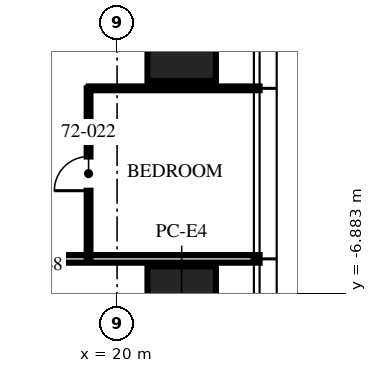
"""IFC4 building model, lengths in metres.
Left out: names, types, materials, properties, quantities, classifications, styles, units other than length and angle.
Written with IfcOpenShell. Run it as: python <this file> out.ifc"""

import sys

from ifc_helpers import new_model, si_unit, direction, frame, frame_2d, origin, origin_2d, place, context, subcontext, project, spatial, rectangle, extrude, element, fill, save


model = new_model("IFC4")
c1 = context("Model", 3, precision=1e-05, world=origin(), true_north=direction((0.0, 1.0)))
c2 = subcontext(c1, "Body", "Model", "MODEL_VIEW")
j1 = project(units=[si_unit("LENGTHUNIT", "METRE"), si_unit("PLANEANGLEUNIT", "RADIAN")], contexts=[c1])
p1 = place(None, origin())
s1 = spatial("IfcSite", under=j1, at=p1, CompositionType="ELEMENT")
p2 = place(p1, origin())
s2 = spatial("IfcBuilding", under=s1, at=p2, CompositionType="ELEMENT")
p3 = place(p2, frame((0.0, 0.0, 289.5)))
s3 = spatial("IfcBuildingStorey", under=s2, at=p3, CompositionType="ELEMENT", Elevation=289.5)
for number, where, z_axis, x_axis in (
    (1, (21.7, 0.0, 0.0), (0.0, 0.0, 1.0), (0.0, 1.0, 0.0)),
    (2, (21.7, -7.48, 0.0), (0.0, 0.0, 1.0), (0.0, 1.0, 0.0)),
):
    element("IfcColumn", number, at=place(p3, frame(where, z_axis=z_axis, x_axis=x_axis)), inside=s3, PredefinedType="COLUMN", context=c2, shape_type="SweptSolid", body=[
        extrude(rectangle(XDim=2.6, YDim=1.8, at=origin_2d()), origin(), (0.0, 0.0, 1.0), 3.75),
    ])
p4 = place(p3, frame((17.95, -5.984, 0.0), z_axis=(0.0, 0.0, 1.0), x_axis=(1.0, 0.0, 0.0)))
e3 = element("IfcWall", 3, at=p4, inside=s3, PredefinedType="PARTITIONING", context=c2, shape_type="SweptSolid", body=[
    extrude(rectangle(XDim=5.8, YDim=0.2, at=frame_2d((2.9, 0.0))), origin(), (0.0, 0.0, 1.0), 3.01),
])
p5 = place(p3, frame((19.25, -1.496, 0.0), z_axis=(0.0, 0.0, 1.0), x_axis=(1.0, 0.0, 0.0)))
e4 = element("IfcWall", 4, at=p5, inside=s3, PredefinedType="PARTITIONING", context=c2, shape_type="SweptSolid", body=[
    extrude(rectangle(XDim=4.5, YDim=0.1, at=frame_2d((2.25, 0.0))), origin(), (0.0, 0.0, 1.0), 3.01),
])
p6 = place(p3, frame((19.25, -5.984, 0.0), z_axis=(0.0, 0.0, 1.0), x_axis=(0.0, 1.0, 0.0)))
e5 = element("IfcWall", 5, at=p6, inside=s3, PredefinedType="PARTITIONING", context=c2, shape_type="SweptSolid", body=[
    extrude(rectangle(XDim=4.488, YDim=0.1, at=frame_2d((2.244, 0.0))), origin(), (0.0, 0.0, 1.0), 2.91),
])
p7 = place(p6, frame((1.794, 0.0, 0.0)))
e6 = element("IfcOpeningElement", 6, at=p7, cuts=e5, PredefinedType="OPENING", context=c2, shape_type="SweptSolid", body=[
    extrude(rectangle(XDim=0.9, YDim=2.1, at=frame_2d((0.45, 1.05))), frame((0.0, 0.06, 0.0), z_axis=(0.0, -1.0, 0.0), x_axis=(1.0, 0.0, 0.0)), (0.0, 0.0, 1.0), 0.12),
])
p8 = place(p7, origin())
e7 = element("IfcDoor", 7, at=p8, inside=s3, OperationType="SINGLE_SWING_LEFT", PredefinedType="DOOR", context=c2, shape_type="SweptSolid", body=[
    extrude(rectangle(XDim=0.9, YDim=2.1, at=frame_2d((0.45, 1.05))), frame((0.0, 0.025, 0.0), z_axis=(0.0, -1.0, 0.0), x_axis=(1.0, 0.0, 0.0)), (0.0, 0.0, 1.0), 0.05),
])
fill(e6, e7)
save(model, sys.argv[1])
